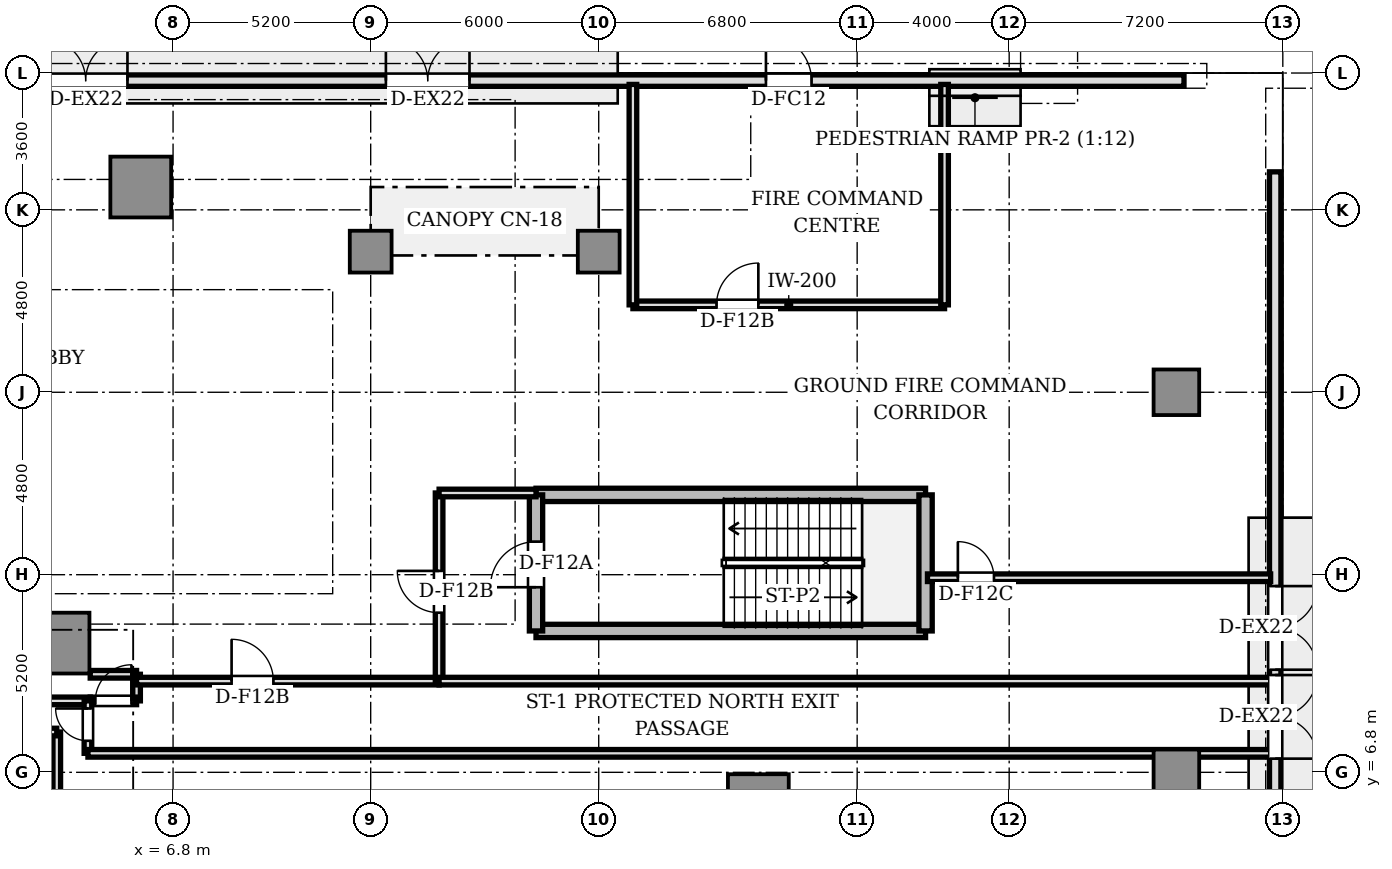
"""IFC4 building model, lengths in metres.
Left out: names, types, materials, properties, quantities, classifications, styles, units other than length and angle.
Written with IfcOpenShell. Run it as: python <this file> out.ifc"""

import sys

from ifc_helpers import new_model, si_unit, direction, frame, frame_2d, origin, origin_2d, place, context, subcontext, project, spatial, rectangle, circle, extrude, source, transform, mapped, element, fill, save


model = new_model("IFC4")
c1 = context("Model", 3, precision=1e-05, world=origin(), true_north=direction((0.0, 1.0)))
c2 = subcontext(c1, "Body", "Model", "MODEL_VIEW")
j1 = project(units=[si_unit("LENGTHUNIT", "METRE"), si_unit("PLANEANGLEUNIT", "RADIAN")], contexts=[c1])
p1 = place(None, origin())
s1 = spatial("IfcSite", under=j1, at=p1, CompositionType="ELEMENT")
p2 = place(p1, origin())
s2 = spatial("IfcBuilding", under=s1, at=p2, CompositionType="ELEMENT")
p3 = place(p2, origin())
s3 = spatial("IfcBuildingStorey", under=s2, at=p3, CompositionType="ELEMENT", Elevation=0.0)
m1 = source(origin(), c2, "Body", "SweptSolid", [
    extrude(rectangle(XDim=1.6, YDim=1.6, at=origin_2d()), origin(), (0.0, 0.0, 1.0), 4.48),
])
for number, where, z_axis, x_axis in (
    (1, (3.8, 10.2, 0.0), (0.0, 0.0, 1.0), (1.0, 0.0, 0.0)),
    (2, (22.2, 5.95, 0.0), (0.0, 0.0, 1.0), (1.0, 0.0, 0.0)),
    (3, (5.95, 22.2, 0.0), (0.0, 0.0, 1.0), (1.0, 0.0, 0.0)),
):
    element("IfcColumn", number, at=place(p3, frame(where, z_axis=z_axis, x_axis=x_axis)), inside=s3, PredefinedType="COLUMN", context=c2, shape_type="MappedRepresentation", body=[
        mapped(m1, transform((0.0, 0.0, 0.0), scale=1.0)),
    ])
m2 = source(origin(), c2, "Body", "SweptSolid", [
    extrude(rectangle(XDim=1.2, YDim=1.2, at=origin_2d()), origin(), (0.0, 0.0, 1.0), 4.48),
])
for number, where, z_axis, x_axis in (
    (4, (33.2, 6.8, 0.0), (0.0, 0.0, 1.0), (1.0, 0.0, 0.0)),
    (5, (33.2, 16.8, 0.0), (0.0, 0.0, 1.0), (1.0, 0.0, 0.0)),
):
    element("IfcColumn", number, at=place(p3, frame(where, z_axis=z_axis, x_axis=x_axis)), inside=s3, PredefinedType="COLUMN", context=c2, shape_type="MappedRepresentation", body=[
        mapped(m2, transform((0.0, 0.0, 0.0), scale=1.0)),
    ])
m3 = source(origin(), c2, "Body", "SweptSolid", [
    extrude(circle(Radius=0.55, at=origin_2d()), origin(), (0.0, 0.0, 1.0), 4.48),
])
for number, where, z_axis, x_axis in (
    (6, (12.0, 20.5, 0.0), (0.0, 0.0, 1.0), (1.0, 0.0, 0.0)),
    (7, (18.0, 20.5, 0.0), (0.0, 0.0, 1.0), (1.0, 0.0, 0.0)),
):
    element("IfcColumn", number, at=place(p3, frame(where, z_axis=z_axis, x_axis=x_axis)), inside=s3, PredefinedType="COLUMN", context=c2, shape_type="MappedRepresentation", body=[
        mapped(m3, transform((0.0, 0.0, 0.0), scale=1.0)),
    ])
p4 = place(p3, frame((-33.4, 25.0, 0.0), z_axis=(0.0, 0.0, 1.0), x_axis=(1.0, 0.0, 0.0)))
e8 = element("IfcWall", 8, at=p4, inside=s3, PredefinedType="STANDARD", context=c2, shape_type="SweptSolid", body=[
    extrude(rectangle(XDim=66.8, YDim=0.3, at=frame_2d((33.4, 0.0))), origin(), (0.0, 0.0, 1.0), 3.8),
])
p5 = place(p4, frame((17.2, 0.0, 0.0)))
e9 = element("IfcOpeningElement", 9, at=p5, cuts=e8, PredefinedType="OPENING", context=c2, shape_type="SweptSolid", body=[
    extrude(rectangle(XDim=2.2, YDim=2.4, at=frame_2d((1.1, 1.2))), frame((0.0, 0.16, 0.0), z_axis=(0.0, -1.0, 0.0), x_axis=(1.0, 0.0, 0.0)), (0.0, 0.0, 1.0), 0.32),
])
p6 = place(p4, frame((22.8, 0.0, 0.0)))
e10 = element("IfcOpeningElement", 10, at=p6, cuts=e8, PredefinedType="OPENING", context=c2, shape_type="SweptSolid", body=[
    extrude(rectangle(XDim=2.2, YDim=2.4, at=frame_2d((1.1, 1.2))), frame((0.0, 0.16, 0.0), z_axis=(0.0, -1.0, 0.0), x_axis=(1.0, 0.0, 0.0)), (0.0, 0.0, 1.0), 0.32),
])
p7 = place(p4, frame((27.8, 0.0, 0.0)))
e11 = element("IfcOpeningElement", 11, at=p7, cuts=e8, PredefinedType="OPENING", context=c2, shape_type="SweptSolid", body=[
    extrude(rectangle(XDim=2.2, YDim=2.4, at=frame_2d((1.1, 1.2))), frame((0.0, 0.16, 0.0), z_axis=(0.0, -1.0, 0.0), x_axis=(1.0, 0.0, 0.0)), (0.0, 0.0, 1.0), 0.32),
])
p8 = place(p4, frame((36.8, 0.0, 0.0)))
e12 = element("IfcOpeningElement", 12, at=p8, cuts=e8, PredefinedType="OPENING", context=c2, shape_type="SweptSolid", body=[
    extrude(rectangle(XDim=2.2, YDim=2.4, at=frame_2d((1.1, 1.2))), frame((0.0, 0.16, 0.0), z_axis=(0.0, -1.0, 0.0), x_axis=(1.0, 0.0, 0.0)), (0.0, 0.0, 1.0), 0.32),
])
p9 = place(p4, frame((45.8, 0.0, 0.0)))
e13 = element("IfcOpeningElement", 13, at=p9, cuts=e8, PredefinedType="OPENING", context=c2, shape_type="SweptSolid", body=[
    extrude(rectangle(XDim=2.2, YDim=2.4, at=frame_2d((1.1, 1.2))), frame((0.0, 0.16, 0.0), z_axis=(0.0, -1.0, 0.0), x_axis=(1.0, 0.0, 0.0)), (0.0, 0.0, 1.0), 0.32),
])
p10 = place(p4, frame((55.8, 0.0, 0.0)))
e14 = element("IfcOpeningElement", 14, at=p10, cuts=e8, PredefinedType="OPENING", context=c2, shape_type="SweptSolid", body=[
    extrude(rectangle(XDim=1.2, YDim=2.2, at=frame_2d((0.6, 1.1))), frame((0.0, 0.16, 0.0), z_axis=(0.0, -1.0, 0.0), x_axis=(1.0, 0.0, 0.0)), (0.0, 0.0, 1.0), 0.32),
])
p11 = place(p3, frame((35.8, 22.6, 0.0), z_axis=(0.0, 0.0, 1.0), x_axis=(0.0, -1.0, 0.0)))
e15 = element("IfcWall", 15, at=p11, inside=s3, PredefinedType="STANDARD", context=c2, shape_type="SweptSolid", body=[
    extrude(rectangle(XDim=47.1, YDim=0.3, at=frame_2d((23.55, 0.0))), origin(), (0.0, 0.0, 1.0), 3.8),
])
p12 = place(p11, frame((10.9, 0.0, 0.0)))
e16 = element("IfcOpeningElement", 16, at=p12, cuts=e15, PredefinedType="OPENING", context=c2, shape_type="SweptSolid", body=[
    extrude(rectangle(XDim=2.2, YDim=2.4, at=frame_2d((1.1, 1.2))), frame((0.0, 0.16, 0.0), z_axis=(0.0, -1.0, 0.0), x_axis=(1.0, 0.0, 0.0)), (0.0, 0.0, 1.0), 0.32),
])
p13 = place(p11, frame((13.24, 0.0, 0.0)))
e17 = element("IfcOpeningElement", 17, at=p13, cuts=e15, PredefinedType="OPENING", context=c2, shape_type="SweptSolid", body=[
    extrude(rectangle(XDim=2.2, YDim=2.4, at=frame_2d((1.1, 1.2))), frame((0.0, 0.16, 0.0), z_axis=(0.0, -1.0, 0.0), x_axis=(1.0, 0.0, 0.0)), (0.0, 0.0, 1.0), 0.32),
])
p14 = place(p11, frame((24.7, 0.0, 0.0)))
e18 = element("IfcOpeningElement", 18, at=p14, cuts=e15, PredefinedType="OPENING", context=c2, shape_type="SweptSolid", body=[
    extrude(rectangle(XDim=2.2, YDim=2.4, at=frame_2d((1.1, 1.2))), frame((0.0, 0.16, 0.0), z_axis=(0.0, -1.0, 0.0), x_axis=(1.0, 0.0, 0.0)), (0.0, 0.0, 1.0), 0.32),
])
p15 = place(p11, frame((32.1, 0.0, 0.0)))
e19 = element("IfcOpeningElement", 19, at=p15, cuts=e15, PredefinedType="OPENING", context=c2, shape_type="SweptSolid", body=[
    extrude(rectangle(XDim=2.2, YDim=2.4, at=frame_2d((1.1, 1.2))), frame((0.0, 0.16, 0.0), z_axis=(0.0, -1.0, 0.0), x_axis=(1.0, 0.0, 0.0)), (0.0, 0.0, 1.0), 0.32),
])
p16 = place(p11, frame((40.9, 0.0, 0.0)))
e20 = element("IfcOpeningElement", 20, at=p16, cuts=e15, PredefinedType="OPENING", context=c2, shape_type="SweptSolid", body=[
    extrude(rectangle(XDim=6.0, YDim=2.8, at=frame_2d((3.0, 1.4))), frame((0.0, 0.16, 0.0), z_axis=(0.0, -1.0, 0.0), x_axis=(1.0, 0.0, 0.0)), (0.0, 0.0, 1.0), 0.32),
])
p17 = place(p3, frame((3.74, 5.38, 0.0), z_axis=(0.0, 0.0, 1.0), x_axis=(0.0, 1.0, 0.0)))
e21 = element("IfcWall", 21, at=p17, inside=s3, PredefinedType="SOLIDWALL", context=c2, shape_type="SweptSolid", body=[
    extrude(rectangle(XDim=2.48, YDim=0.2, at=frame_2d((1.24, 0.0))), origin(), (0.0, 0.0, 1.0), 4.03),
])
p18 = place(p3, frame((1.9, 7.86, 0.0), z_axis=(0.0, 0.0, 1.0), x_axis=(1.0, 0.0, 0.0)))
e22 = element("IfcWall", 22, at=p18, inside=s3, PredefinedType="SOLIDWALL", context=c2, shape_type="SweptSolid", body=[
    extrude(rectangle(XDim=1.84, YDim=0.2, at=frame_2d((0.92, 0.0))), origin(), (0.0, 0.0, 1.0), 4.03),
])
p19 = place(p18, frame((0.36, 0.0, 0.0)))
e23 = element("IfcOpeningElement", 23, at=p19, cuts=e22, PredefinedType="OPENING", context=c2, shape_type="SweptSolid", body=[
    extrude(rectangle(XDim=1.1, YDim=2.2, at=frame_2d((0.55, 1.1))), frame((0.0, 0.11, 0.0), z_axis=(0.0, -1.0, 0.0), x_axis=(1.0, 0.0, 0.0)), (0.0, 0.0, 1.0), 0.22),
])
for number, where, z_axis, x_axis in (
    (24, (16.35, 14.1, 0.0), (0.0, 0.0, 1.0), (1.0, 0.0, 0.0)),
    (25, (16.35, 10.52, 0.0), (0.0, 0.0, 1.0), (1.0, 0.0, 0.0)),
):
    element("IfcWall", number, at=place(p3, frame(where, z_axis=z_axis, x_axis=x_axis)), inside=s3, PredefinedType="SHEAR", context=c2, shape_type="SweptSolid", body=[
        extrude(rectangle(XDim=10.25, YDim=0.35, at=frame_2d((5.125, 0.0))), origin(), (0.0, 0.0, 1.0), 4.48),
    ])
p20 = place(p3, frame((16.35, 10.52, 0.0), z_axis=(0.0, 0.0, 1.0), x_axis=(0.0, 1.0, 0.0)))
e26 = element("IfcWall", 26, at=p20, inside=s3, PredefinedType="SHEAR", context=c2, shape_type="SweptSolid", body=[
    extrude(rectangle(XDim=3.58, YDim=0.35, at=frame_2d((1.79, 0.0))), origin(), (0.0, 0.0, 1.0), 4.48),
])
p21 = place(p20, frame((1.15, 0.0, 0.0)))
e27 = element("IfcOpeningElement", 27, at=p21, cuts=e26, PredefinedType="OPENING", context=c2, shape_type="SweptSolid", body=[
    extrude(rectangle(XDim=1.2, YDim=2.2, at=frame_2d((0.6, 1.1))), frame((0.0, 0.185, 0.0), z_axis=(0.0, -1.0, 0.0), x_axis=(1.0, 0.0, 0.0)), (0.0, 0.0, 1.0), 0.37),
])
p22 = place(p3, frame((26.6, 10.52, 0.0), z_axis=(0.0, 0.0, 1.0), x_axis=(0.0, 1.0, 0.0)))
e28 = element("IfcWall", 28, at=p22, inside=s3, PredefinedType="SHEAR", context=c2, shape_type="SweptSolid", body=[
    extrude(rectangle(XDim=3.58, YDim=0.35, at=frame_2d((1.79, 0.0))), origin(), (0.0, 0.0, 1.0), 4.48),
])
p23 = place(p3, frame((18.9, 19.1, 0.0), z_axis=(0.0, 0.0, 1.0), x_axis=(1.0, 0.0, 0.0)))
e29 = element("IfcWall", 29, at=p23, inside=s3, PredefinedType="SOLIDWALL", context=c2, shape_type="SweptSolid", body=[
    extrude(rectangle(XDim=8.2, YDim=0.2, at=frame_2d((4.1, 0.0))), origin(), (0.0, 0.0, 1.0), 4.03),
])
p24 = place(p23, frame((2.2, 0.0, 0.0)))
e30 = element("IfcOpeningElement", 30, at=p24, cuts=e29, PredefinedType="OPENING", context=c2, shape_type="SweptSolid", body=[
    extrude(rectangle(XDim=1.1, YDim=2.15, at=frame_2d((0.55, 1.075))), frame((0.0, 0.11, 0.0), z_axis=(0.0, -1.0, 0.0), x_axis=(1.0, 0.0, 0.0)), (0.0, 0.0, 1.0), 0.22),
])
for number, where, z_axis, x_axis in (
    (31, (18.9, 19.1, 0.0), (0.0, 0.0, 1.0), (0.0, 1.0, 0.0)),
    (32, (27.1, 19.1, 0.0), (0.0, 0.0, 1.0), (0.0, 1.0, 0.0)),
):
    element("IfcWall", number, at=place(p3, frame(where, z_axis=z_axis, x_axis=x_axis)), inside=s3, PredefinedType="SOLIDWALL", context=c2, shape_type="SweptSolid", body=[
        extrude(rectangle(XDim=5.8, YDim=0.2, at=frame_2d((2.9, 0.0))), origin(), (0.0, 0.0, 1.0), 4.03),
    ])
p25 = place(p3, frame((0.12, 8.68, 0.0), z_axis=(0.0, 0.0, 1.0), x_axis=(1.0, 0.0, 0.0)))
e33 = element("IfcWall", 33, at=p25, inside=s3, PredefinedType="SOLIDWALL", context=c2, shape_type="SweptSolid", body=[
    extrude(rectangle(XDim=4.5, YDim=0.2, at=frame_2d((2.25, 0.0))), origin(), (0.0, 0.0, 1.0), 4.03),
])
p26 = place(p3, frame((4.62, 9.38, 0.0), z_axis=(0.0, 0.0, 1.0), x_axis=(1.0, 0.0, 0.0)))
e34 = element("IfcWall", 34, at=p26, inside=s3, PredefinedType="SOLIDWALL", context=c2, shape_type="SweptSolid", body=[
    extrude(rectangle(XDim=1.22, YDim=0.2, at=frame_2d((0.61, 0.0))), origin(), (0.0, 0.0, 1.0), 4.03),
])
p27 = place(p3, frame((5.84, 8.68, 0.0), z_axis=(0.0, 0.0, 1.0), x_axis=(0.0, 1.0, 0.0)))
e35 = element("IfcWall", 35, at=p27, inside=s3, PredefinedType="SOLIDWALL", context=c2, shape_type="SweptSolid", body=[
    extrude(rectangle(XDim=0.7, YDim=0.2, at=frame_2d((0.35, 0.0))), origin(), (0.0, 0.0, 1.0), 4.03),
])
p28 = place(p3, frame((4.62, 8.68, 0.0), z_axis=(0.0, 0.0, 1.0), x_axis=(1.0, 0.0, 0.0)))
e36 = element("IfcWall", 36, at=p28, inside=s3, PredefinedType="SOLIDWALL", context=c2, shape_type="SweptSolid", body=[
    extrude(rectangle(XDim=1.22, YDim=0.2, at=frame_2d((0.61, 0.0))), origin(), (0.0, 0.0, 1.0), 4.03),
])
p29 = place(p28, frame((0.135, 0.0, 0.0)))
e37 = element("IfcOpeningElement", 37, at=p29, cuts=e36, PredefinedType="OPENING", context=c2, shape_type="SweptSolid", body=[
    extrude(rectangle(XDim=0.95, YDim=2.15, at=frame_2d((0.475, 1.075))), frame((0.0, 0.11, 0.0), z_axis=(0.0, -1.0, 0.0), x_axis=(1.0, 0.0, 0.0)), (0.0, 0.0, 1.0), 0.22),
])
p30 = place(p3, frame((4.56, 7.3, 0.0), z_axis=(0.0, 0.0, 1.0), x_axis=(0.0, 1.0, 0.0)))
e38 = element("IfcWall", 38, at=p30, inside=s3, PredefinedType="SOLIDWALL", context=c2, shape_type="SweptSolid", body=[
    extrude(rectangle(XDim=1.38, YDim=0.2, at=frame_2d((0.69, 0.0))), origin(), (0.0, 0.0, 1.0), 4.03),
])
p31 = place(p30, frame((0.33, 0.0, 0.0)))
e39 = element("IfcOpeningElement", 39, at=p31, cuts=e38, PredefinedType="OPENING", context=c2, shape_type="SweptSolid", body=[
    extrude(rectangle(XDim=0.85, YDim=2.1, at=frame_2d((0.425, 1.05))), frame((0.0, 0.11, 0.0), z_axis=(0.0, -1.0, 0.0), x_axis=(1.0, 0.0, 0.0)), (0.0, 0.0, 1.0), 0.22),
])
p32 = place(p3, frame((4.56, 7.3, 0.0), z_axis=(0.0, 0.0, 1.0), x_axis=(1.0, 0.0, 0.0)))
e40 = element("IfcWall", 40, at=p32, inside=s3, PredefinedType="SOLIDWALL", context=c2, shape_type="SweptSolid", body=[
    extrude(rectangle(XDim=31.12, YDim=0.2, at=frame_2d((15.56, 0.0))), origin(), (0.0, 0.0, 1.0), 3.95),
])
p33 = place(p3, frame((5.84, 9.2, 0.0), z_axis=(0.0, 0.0, 1.0), x_axis=(1.0, 0.0, 0.0)))
e41 = element("IfcWall", 41, at=p33, inside=s3, PredefinedType="SOLIDWALL", context=c2, shape_type="SweptSolid", body=[
    extrude(rectangle(XDim=7.96, YDim=0.2, at=frame_2d((3.98, 0.0))), origin(), (0.0, 0.0, 1.0), 4.03),
])
p34 = place(p33, frame((2.5, 0.0, 0.0)))
e42 = element("IfcOpeningElement", 42, at=p34, cuts=e41, PredefinedType="OPENING", context=c2, shape_type="SweptSolid", body=[
    extrude(rectangle(XDim=1.1, YDim=2.15, at=frame_2d((0.55, 1.075))), frame((0.0, 0.11, 0.0), z_axis=(0.0, -1.0, 0.0), x_axis=(1.0, 0.0, 0.0)), (0.0, 0.0, 1.0), 0.22),
])
p35 = place(p3, frame((13.8, 9.2, 0.0), z_axis=(0.0, 0.0, 1.0), x_axis=(0.0, 1.0, 0.0)))
e43 = element("IfcWall", 43, at=p35, inside=s3, PredefinedType="SOLIDWALL", context=c2, shape_type="SweptSolid", body=[
    extrude(rectangle(XDim=4.95, YDim=0.2, at=frame_2d((2.475, 0.0))), origin(), (0.0, 0.0, 1.0), 4.03),
])
p36 = place(p35, frame((1.8, 0.0, 0.0)))
e44 = element("IfcOpeningElement", 44, at=p36, cuts=e43, PredefinedType="OPENING", context=c2, shape_type="SweptSolid", body=[
    extrude(rectangle(XDim=1.1, YDim=2.15, at=frame_2d((0.55, 1.075))), frame((0.0, 0.11, 0.0), z_axis=(0.0, -1.0, 0.0), x_axis=(1.0, 0.0, 0.0)), (0.0, 0.0, 1.0), 0.22),
])
p37 = place(p3, frame((13.8, 14.15, 0.0), z_axis=(0.0, 0.0, 1.0), x_axis=(1.0, 0.0, 0.0)))
e45 = element("IfcWall", 45, at=p37, inside=s3, PredefinedType="SOLIDWALL", context=c2, shape_type="SweptSolid", body=[
    extrude(rectangle(XDim=2.55, YDim=0.2, at=frame_2d((1.275, 0.0))), origin(), (0.0, 0.0, 1.0), 4.03),
])
p38 = place(p3, frame((13.8, 9.2, 0.0), z_axis=(0.0, 0.0, 1.0), x_axis=(1.0, 0.0, 0.0)))
e46 = element("IfcWall", 46, at=p38, inside=s3, PredefinedType="SOLIDWALL", context=c2, shape_type="SweptSolid", body=[
    extrude(rectangle(XDim=21.88, YDim=0.2, at=frame_2d((10.94, 0.0))), origin(), (0.0, 0.0, 1.0), 3.95),
])
p39 = place(p3, frame((26.65, 11.92, 0.0), z_axis=(0.0, 0.0, 1.0), x_axis=(1.0, 0.0, 0.0)))
e47 = element("IfcWall", 47, at=p39, inside=s3, PredefinedType="SOLIDWALL", context=c2, shape_type="SweptSolid", body=[
    extrude(rectangle(XDim=9.03, YDim=0.2, at=frame_2d((4.515, 0.0))), origin(), (0.0, 0.0, 1.0), 4.03),
])
p40 = place(p39, frame((0.8, 0.0, 0.0)))
e48 = element("IfcOpeningElement", 48, at=p40, cuts=e47, PredefinedType="OPENING", context=c2, shape_type="SweptSolid", body=[
    extrude(rectangle(XDim=0.95, YDim=2.15, at=frame_2d((0.475, 1.075))), frame((0.0, 0.11, 0.0), z_axis=(0.0, -1.0, 0.0), x_axis=(1.0, 0.0, 0.0)), (0.0, 0.0, 1.0), 0.22),
])
m4 = source(origin(), c2, "Body", "SweptSolid", [
    extrude(rectangle(XDim=2.2, YDim=0.05, at=origin_2d()), origin(), (0.0, 0.0, 1.0), 2.4),
])
p41 = place(p8, frame((1.1, 0.0, 0.0)))
e49 = element("IfcDoor", 49, at=p41, inside=s3, OperationType="DOUBLE_DOOR_SINGLE_SWING", PredefinedType="DOOR", context=c2, shape_type="MappedRepresentation", body=[
    mapped(m4, transform((0.0, 0.0, 0.0), scale=1.0)),
])
fill(e12, e49)
p42 = place(p9, frame((1.1, 0.0, 0.0)))
e50 = element("IfcDoor", 50, at=p42, inside=s3, OperationType="DOUBLE_DOOR_SINGLE_SWING", PredefinedType="DOOR", context=c2, shape_type="MappedRepresentation", body=[
    mapped(m4, transform((0.0, 0.0, 0.0), scale=1.0)),
])
fill(e13, e50)
m5 = source(origin(), c2, "Body", "SweptSolid", [
    extrude(rectangle(XDim=1.2, YDim=0.05, at=origin_2d()), origin(), (0.0, 0.0, 1.0), 2.2),
])
p43 = place(p10, frame((0.6, 0.0, 0.0)))
e51 = element("IfcDoor", 51, at=p43, inside=s3, OperationType="SINGLE_SWING_LEFT", PredefinedType="DOOR", context=c2, shape_type="MappedRepresentation", body=[
    mapped(m5, transform((0.0, 0.0, 0.0), scale=1.0)),
])
fill(e14, e51)
p44 = place(p12, frame((1.1, 0.0, 0.0)))
e52 = element("IfcDoor", 52, at=p44, inside=s3, OperationType="DOUBLE_DOOR_SINGLE_SWING", PredefinedType="DOOR", context=c2, shape_type="MappedRepresentation", body=[
    mapped(m4, transform((0.0, 0.0, 0.0), scale=1.0)),
])
fill(e16, e52)
p45 = place(p13, frame((1.1, 0.0, 0.0)))
e53 = element("IfcDoor", 53, at=p45, inside=s3, OperationType="DOUBLE_DOOR_SINGLE_SWING", PredefinedType="DOOR", context=c2, shape_type="MappedRepresentation", body=[
    mapped(m4, transform((0.0, 0.0, 0.0), scale=1.0)),
])
fill(e17, e53)
p46 = place(p21, frame((0.6, 0.0, 0.0)))
e54 = element("IfcDoor", 54, at=p46, inside=s3, OperationType="SINGLE_SWING_LEFT", PredefinedType="DOOR", context=c2, shape_type="MappedRepresentation", body=[
    mapped(m5, transform((0.0, 0.0, 0.0), scale=1.0)),
])
fill(e27, e54)
m6 = source(origin(), c2, "Body", "SweptSolid", [
    extrude(rectangle(XDim=1.1, YDim=0.05, at=origin_2d()), origin(), (0.0, 0.0, 1.0), 2.15),
])
p47 = place(p24, frame((0.55, 0.0, 0.0)))
e55 = element("IfcDoor", 55, at=p47, inside=s3, OperationType="SINGLE_SWING_RIGHT", PredefinedType="DOOR", context=c2, shape_type="MappedRepresentation", body=[
    mapped(m6, transform((0.0, 0.0, 0.0), scale=1.0)),
])
fill(e30, e55)
m7 = source(origin(), c2, "Body", "SweptSolid", [
    extrude(rectangle(XDim=0.95, YDim=0.05, at=origin_2d()), origin(), (0.0, 0.0, 1.0), 2.15),
])
p48 = place(p29, frame((0.475, 0.0, 0.0)))
e56 = element("IfcDoor", 56, at=p48, inside=s3, OperationType="SINGLE_SWING_RIGHT", PredefinedType="DOOR", context=c2, shape_type="MappedRepresentation", body=[
    mapped(m7, transform((0.0, 0.0, 0.0), scale=1.0)),
])
fill(e37, e56)
m8 = source(origin(), c2, "Body", "SweptSolid", [
    extrude(rectangle(XDim=0.85, YDim=0.05, at=origin_2d()), origin(), (0.0, 0.0, 1.0), 2.1),
])
p49 = place(p31, frame((0.425, 0.0, 0.0)))
e57 = element("IfcDoor", 57, at=p49, inside=s3, OperationType="SINGLE_SWING_RIGHT", PredefinedType="DOOR", context=c2, shape_type="MappedRepresentation", body=[
    mapped(m8, transform((0.0, 0.0, 0.0), scale=1.0)),
])
fill(e39, e57)
p50 = place(p34, frame((0.55, 0.0, 0.0)))
e58 = element("IfcDoor", 58, at=p50, inside=s3, OperationType="SINGLE_SWING_LEFT", PredefinedType="DOOR", context=c2, shape_type="MappedRepresentation", body=[
    mapped(m6, transform((0.0, 0.0, 0.0), scale=1.0)),
])
fill(e42, e58)
p51 = place(p36, frame((0.55, 0.0, 0.0)))
e59 = element("IfcDoor", 59, at=p51, inside=s3, OperationType="SINGLE_SWING_RIGHT", PredefinedType="DOOR", context=c2, shape_type="MappedRepresentation", body=[
    mapped(m6, transform((0.0, 0.0, 0.0), scale=1.0)),
])
fill(e44, e59)
p52 = place(p40, frame((0.475, 0.0, 0.0)))
e60 = element("IfcDoor", 60, at=p52, inside=s3, OperationType="SINGLE_SWING_LEFT", PredefinedType="DOOR", context=c2, shape_type="MappedRepresentation", body=[
    mapped(m7, transform((0.0, 0.0, 0.0), scale=1.0)),
])
fill(e48, e60)
save(model, sys.argv[1])
